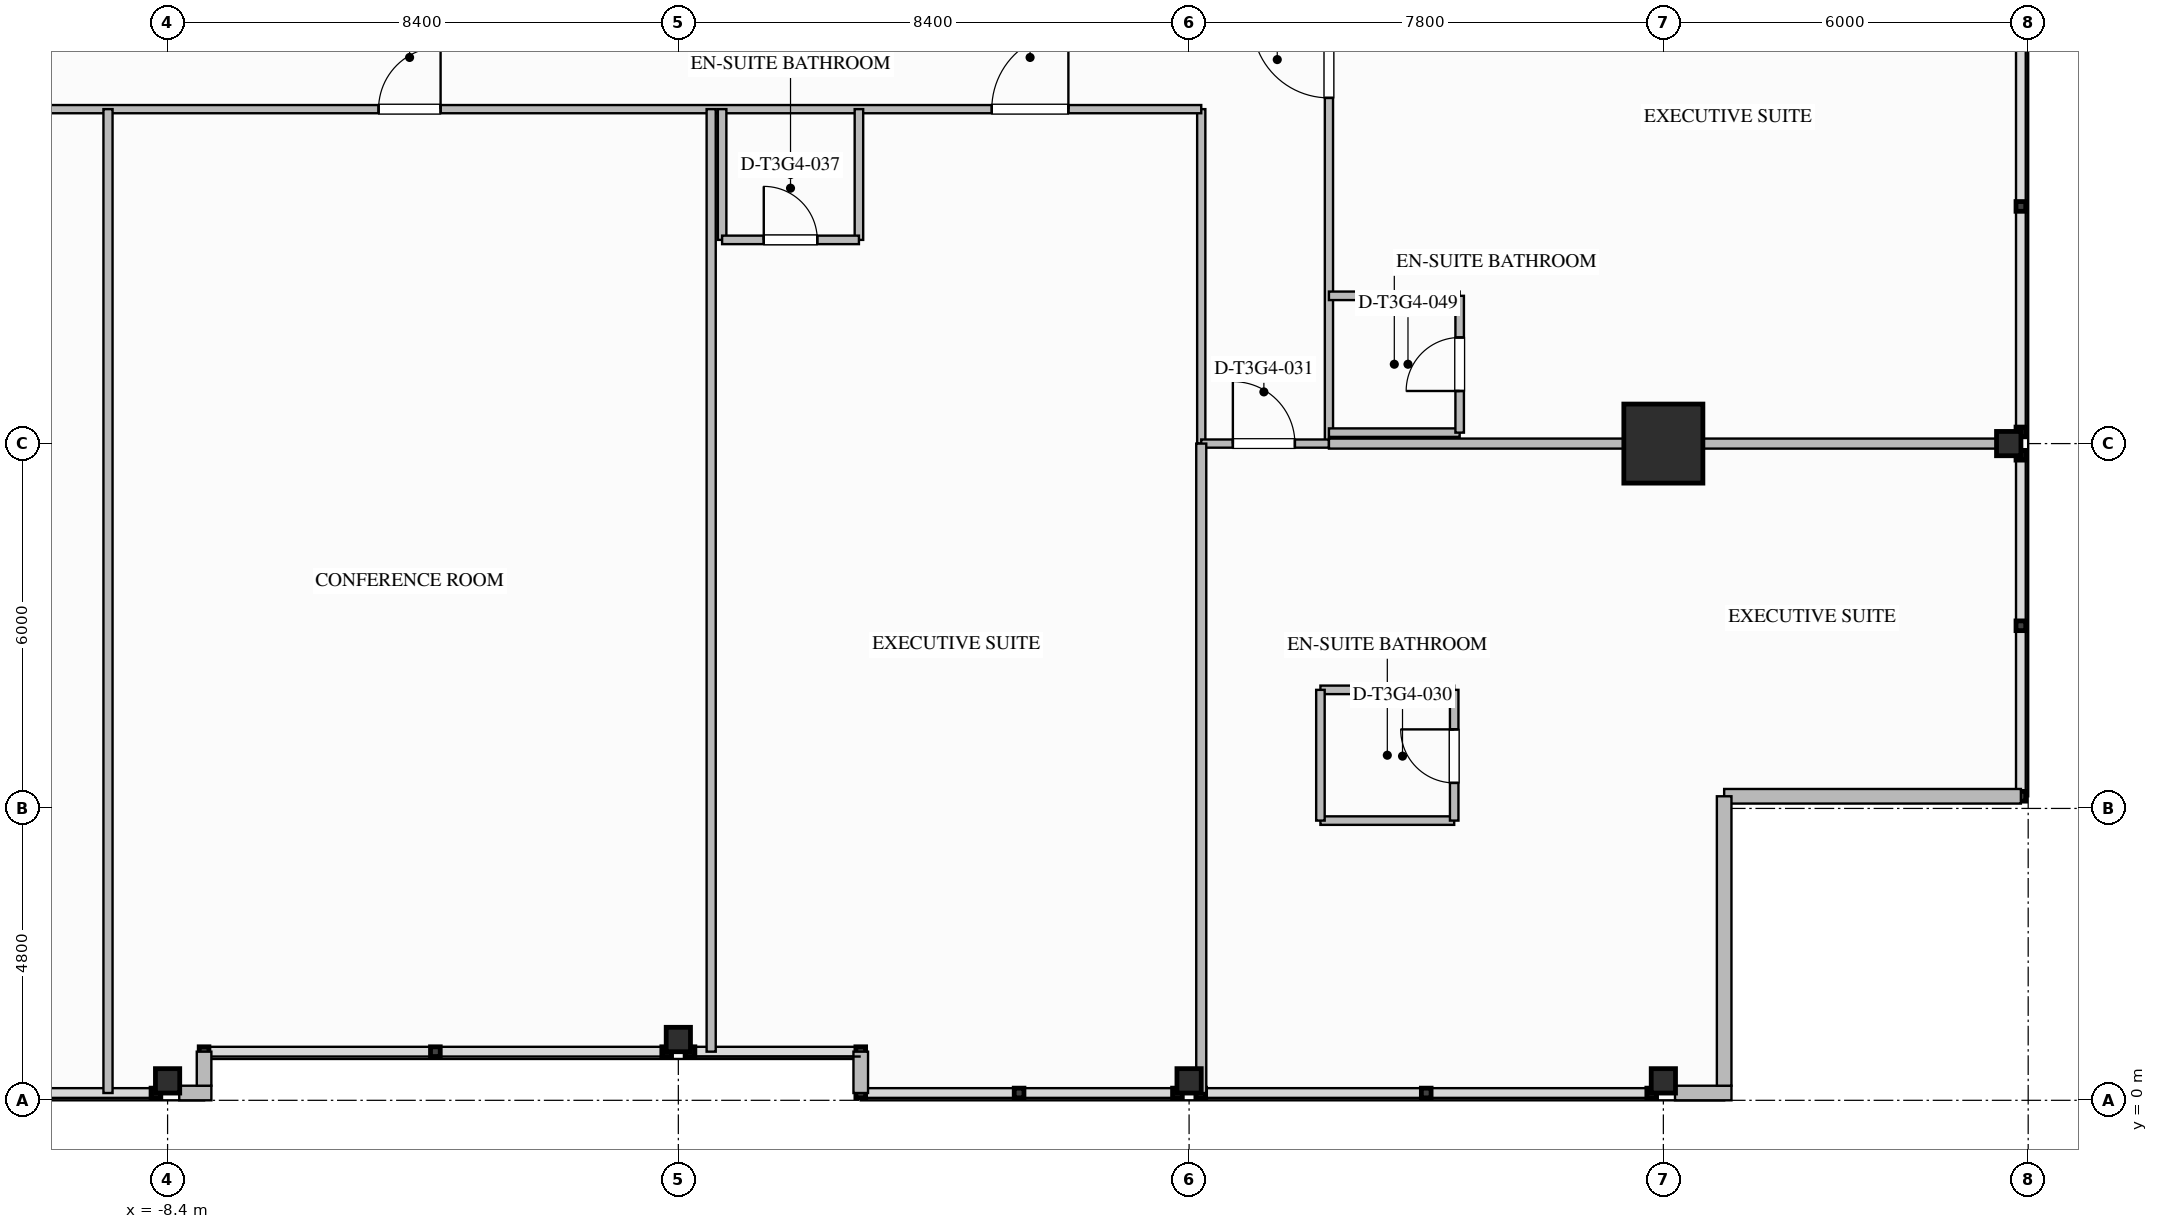
"""IFC4 building model, lengths in metres.
Left out: names, types, materials, properties, quantities, classifications, styles, units other than length and angle.
Written with IfcOpenShell. Run it as: python <this file> out.ifc"""

import sys

from ifc_helpers import new_model, si_unit, direction, frame, frame_2d, origin, origin_2d, place, context, subcontext, project, spatial, rectangle, i_section, extrude, element, fill, save


model = new_model("IFC4")
c1 = context("Model", 3, precision=1e-05, world=origin(), true_north=direction((0.0, 1.0)))
c2 = subcontext(c1, "Body", "Model", "MODEL_VIEW")
j1 = project(units=[si_unit("LENGTHUNIT", "METRE"), si_unit("PLANEANGLEUNIT", "RADIAN")], contexts=[c1])
p1 = place(None, origin())
s1 = spatial("IfcSite", under=j1, at=p1, CompositionType="ELEMENT")
p2 = place(p1, origin())
s2 = spatial("IfcBuilding", under=s1, at=p2, CompositionType="ELEMENT")
p3 = place(p2, frame((0.0, 0.0, 182.35)))
s3 = spatial("IfcBuildingStorey", under=s2, at=p3, CompositionType="ELEMENT", Elevation=182.35)
p4 = place(p3, frame((16.2, 10.8, 0.0), z_axis=(0.0, 0.0, 1.0), x_axis=(1.0, 0.0, 0.0)))
e1 = element("IfcColumn", 1, at=p4, inside=s3, PredefinedType="COLUMN", context=c2, shape_type="SweptSolid", body=[
    extrude(rectangle(XDim=1.3, YDim=1.3, at=origin_2d()), origin(), (0.0, 0.0, 1.0), 3.55),
])
for number, where, z_axis, x_axis in (
    (2, (21.88, 10.8, 0.0), (0.0, 0.0, 1.0), (1.0, 0.0, 0.0)),
    (3, (-8.4, 0.32, 0.0), (0.0, 0.0, 1.0), (0.0, 1.0, 0.0)),
    (4, (0.0, 1.0, 0.0), (0.0, 0.0, 1.0), (0.0, 1.0, 0.0)),
    (5, (8.4, 0.32, 0.0), (0.0, 0.0, 1.0), (0.0, 1.0, 0.0)),
    (6, (16.2, 0.32, 0.0), (0.0, 0.0, 1.0), (0.0, 1.0, 0.0)),
):
    element("IfcColumn", number, at=place(p3, frame(where, z_axis=z_axis, x_axis=x_axis)), inside=s3, PredefinedType="COLUMN", context=c2, shape_type="SweptSolid", body=[
        extrude(i_section(OverallWidth=0.401, OverallDepth=0.399, WebThickness=0.025, FlangeThickness=0.04, FilletRadius=0.025, at=origin_2d()), origin(), (0.0, 0.0, 1.0), 3.547),
    ])
p5 = place(p3, frame((17.32, 0.12, 0.0), z_axis=(0.0, 0.0, 1.0), x_axis=(-1.0, 0.0, 0.0)))
e7 = element("IfcWall", 7, at=p5, inside=s3, PredefinedType="STANDARD", context=c2, shape_type="SweptSolid", body=[
    extrude(rectangle(XDim=0.928, YDim=0.24, at=frame_2d((0.464, 0.0))), origin(), (0.0, 0.0, 1.0), 3.29),
])
p6 = place(p3, frame((-7.68, 0.12, 0.0), z_axis=(0.0, 0.0, 1.0), x_axis=(-1.0, 0.0, 0.0)))
e8 = element("IfcWall", 8, at=p6, inside=s3, PredefinedType="STANDARD", context=c2, shape_type="SweptSolid", body=[
    extrude(rectangle(XDim=0.528, YDim=0.24, at=frame_2d((0.264, 0.0))), origin(), (0.0, 0.0, 1.0), 3.29),
])
p7 = place(p3, frame((22.08, 5.0, 0.0), z_axis=(0.0, 0.0, 1.0), x_axis=(-1.0, 0.0, 0.0)))
e9 = element("IfcWall", 9, at=p7, inside=s3, PredefinedType="STANDARD", context=c2, shape_type="SweptSolid", body=[
    extrude(rectangle(XDim=4.88, YDim=0.24, at=frame_2d((2.44, 0.0))), origin(), (0.0, 0.0, 1.0), 3.29),
])
p8 = place(p3, frame((17.2, 5.0, 0.0), z_axis=(0.0, 0.0, 1.0), x_axis=(0.0, -1.0, 0.0)))
e10 = element("IfcWall", 10, at=p8, inside=s3, PredefinedType="STANDARD", context=c2, shape_type="SweptSolid", body=[
    extrude(rectangle(XDim=4.76, YDim=0.24, at=frame_2d((2.38, 0.0))), origin(), (0.0, 0.0, 1.0), 3.29),
])
p9 = place(p3, frame((3.0, 0.12, 0.0), z_axis=(0.0, 0.0, 1.0), x_axis=(0.0, 1.0, 0.0)))
e11 = element("IfcWall", 11, at=p9, inside=s3, PredefinedType="STANDARD", context=c2, shape_type="SweptSolid", body=[
    extrude(rectangle(XDim=0.68, YDim=0.24, at=frame_2d((0.34, 0.0))), origin(), (0.0, 0.0, 1.0), 3.29),
])
p10 = place(p3, frame((-7.8, 0.8, 0.0), z_axis=(0.0, 0.0, 1.0), x_axis=(0.0, -1.0, 0.0)))
e12 = element("IfcWall", 12, at=p10, inside=s3, PredefinedType="STANDARD", context=c2, shape_type="SweptSolid", body=[
    extrude(rectangle(XDim=0.56, YDim=0.24, at=frame_2d((0.28, 0.0))), origin(), (0.0, 0.0, 1.0), 3.29),
])
p11 = place(p3, frame((8.6, 10.8, 0.0), z_axis=(0.0, 0.0, 1.0), x_axis=(0.0, 1.0, 0.0)))
e13 = element("IfcWall", 13, at=p11, inside=s3, PredefinedType="PARTITIONING", context=c2, shape_type="SweptSolid", body=[
    extrude(rectangle(XDim=5.5, YDim=0.135, at=frame_2d((2.75, 0.0))), origin(), (0.0, 0.0, 1.0), 2.667),
])
p12 = place(p3, frame((-16.2, 16.3, 0.0), z_axis=(0.0, 0.0, 1.0), x_axis=(1.0, 0.0, 0.0)))
e14 = element("IfcWall", 14, at=p12, inside=s3, PredefinedType="PARTITIONING", context=c2, shape_type="SweptSolid", body=[
    extrude(rectangle(XDim=24.8, YDim=0.135, at=frame_2d((12.4, 0.0))), origin(), (0.0, 0.0, 1.0), 3.29),
])
p13 = place(p12, frame((3.995, 0.0, 0.0)))
e15 = element("IfcOpeningElement", 15, at=p13, cuts=e14, PredefinedType="OPENING", context=c2, shape_type="SweptSolid", body=[
    extrude(rectangle(XDim=1.26, YDim=2.2, at=frame_2d((0.63, 1.1))), frame((0.0, 0.077, 0.0), z_axis=(0.0, -1.0, 0.0), x_axis=(1.0, 0.0, 0.0)), (0.0, 0.0, 1.0), 0.155),
])
p14 = place(p12, frame((11.27, 0.0, 0.0)))
e16 = element("IfcOpeningElement", 16, at=p14, cuts=e14, PredefinedType="OPENING", context=c2, shape_type="SweptSolid", body=[
    extrude(rectangle(XDim=1.02, YDim=2.15, at=frame_2d((0.51, 1.075))), frame((0.0, 0.077, 0.0), z_axis=(0.0, -1.0, 0.0), x_axis=(1.0, 0.0, 0.0)), (0.0, 0.0, 1.0), 0.155),
])
p15 = place(p12, frame((21.355, 0.0, 0.0)))
e17 = element("IfcOpeningElement", 17, at=p15, cuts=e14, PredefinedType="OPENING", context=c2, shape_type="SweptSolid", body=[
    extrude(rectangle(XDim=1.26, YDim=2.2, at=frame_2d((0.63, 1.1))), frame((0.0, 0.077, 0.0), z_axis=(0.0, -1.0, 0.0), x_axis=(1.0, 0.0, 0.0)), (0.0, 0.0, 1.0), 0.155),
])
p16 = place(p3, frame((10.7, 10.8, 0.0), z_axis=(0.0, 0.0, 1.0), x_axis=(0.0, 1.0, 0.0)))
e18 = element("IfcWall", 18, at=p16, inside=s3, PredefinedType="PARTITIONING", context=c2, shape_type="SweptSolid", body=[
    extrude(rectangle(XDim=32.4, YDim=0.135, at=frame_2d((16.2, 0.0))), origin(), (0.0, 0.0, 1.0), 3.29),
])
p17 = place(p16, frame((5.685, 0.0, 0.0)))
e19 = element("IfcOpeningElement", 19, at=p17, cuts=e18, PredefinedType="OPENING", context=c2, shape_type="SweptSolid", body=[
    extrude(rectangle(XDim=1.26, YDim=2.2, at=frame_2d((0.63, 1.1))), frame((0.0, 0.077, 0.0), z_axis=(0.0, -1.0, 0.0), x_axis=(1.0, 0.0, 0.0)), (0.0, 0.0, 1.0), 0.155),
])
p18 = place(p16, frame((11.655, 0.0, 0.0)))
e20 = element("IfcOpeningElement", 20, at=p18, cuts=e18, PredefinedType="OPENING", context=c2, shape_type="SweptSolid", body=[
    extrude(rectangle(XDim=1.26, YDim=2.2, at=frame_2d((0.63, 1.1))), frame((0.0, 0.077, 0.0), z_axis=(0.0, -1.0, 0.0), x_axis=(1.0, 0.0, 0.0)), (0.0, 0.0, 1.0), 0.155),
])
p19 = place(p16, frame((21.885, 0.0, 0.0)))
e21 = element("IfcOpeningElement", 21, at=p19, cuts=e18, PredefinedType="OPENING", context=c2, shape_type="SweptSolid", body=[
    extrude(rectangle(XDim=1.26, YDim=2.2, at=frame_2d((0.63, 1.1))), frame((0.0, 0.077, 0.0), z_axis=(0.0, -1.0, 0.0), x_axis=(1.0, 0.0, 0.0)), (0.0, 0.0, 1.0), 0.155),
])
p20 = place(p16, frame((27.255, 0.0, 0.0)))
e22 = element("IfcOpeningElement", 22, at=p20, cuts=e18, PredefinedType="OPENING", context=c2, shape_type="SweptSolid", body=[
    extrude(rectangle(XDim=1.26, YDim=2.2, at=frame_2d((0.63, 1.1))), frame((0.0, 0.077, 0.0), z_axis=(0.0, -1.0, 0.0), x_axis=(1.0, 0.0, 0.0)), (0.0, 0.0, 1.0), 0.155),
])
p21 = place(p3, frame((8.6, 10.8, 0.0), z_axis=(0.0, 0.0, 1.0), x_axis=(1.0, 0.0, 0.0)))
e23 = element("IfcWall", 23, at=p21, inside=s3, PredefinedType="PARTITIONING", context=c2, shape_type="SweptSolid", body=[
    extrude(rectangle(XDim=2.1, YDim=0.135, at=frame_2d((1.05, 0.0))), origin(), (0.0, 0.0, 1.0), 2.579),
])
p22 = place(p21, frame((0.52, 0.0, 0.0)))
e24 = element("IfcOpeningElement", 24, at=p22, cuts=e23, PredefinedType="OPENING", context=c2, shape_type="SweptSolid", body=[
    extrude(rectangle(XDim=1.02, YDim=2.15, at=frame_2d((0.51, 1.075))), frame((0.0, 0.077, 0.0), z_axis=(0.0, -1.0, 0.0), x_axis=(1.0, 0.0, 0.0)), (0.0, 0.0, 1.0), 0.155),
])
p23 = place(p3, frame((8.6, 0.12, 0.0), z_axis=(0.0, 0.0, 1.0), x_axis=(0.0, 1.0, 0.0)))
e25 = element("IfcWall", 25, at=p23, inside=s3, PredefinedType="PARTITIONING", context=c2, shape_type="SweptSolid", body=[
    extrude(rectangle(XDim=10.68, YDim=0.165, at=frame_2d((5.34, 0.0))), origin(), (0.0, 0.0, 1.0), 2.579),
])
p24 = place(p3, frame((10.7, 10.8, 0.0), z_axis=(0.0, 0.0, 1.0), x_axis=(1.0, 0.0, 0.0)))
e26 = element("IfcWall", 26, at=p24, inside=s3, PredefinedType="PARTITIONING", context=c2, shape_type="SweptSolid", body=[
    extrude(rectangle(XDim=11.38, YDim=0.165, at=frame_2d((5.69, 0.0))), origin(), (0.0, 0.0, 1.0), 2.579),
])
for number, where, z_axis, x_axis in (
    (27, (10.56, 4.6, 0.0), (0.0, 0.0, 1.0), (1.0, 0.0, 0.0)),
    (28, (10.56, 6.75, 0.0), (0.0, 0.0, 1.0), (1.0, 0.0, 0.0)),
):
    element("IfcWall", number, at=place(p3, frame(where, z_axis=z_axis, x_axis=x_axis)), inside=s3, PredefinedType="PLUMBINGWALL", context=c2, shape_type="SweptSolid", body=[
        extrude(rectangle(XDim=2.2, YDim=0.14, at=frame_2d((1.1, 0.0))), origin(), (0.0, 0.0, 1.0), 3.29),
    ])
p25 = place(p3, frame((10.56, 4.6, 0.0), z_axis=(0.0, 0.0, 1.0), x_axis=(0.0, 1.0, 0.0)))
e29 = element("IfcWall", 29, at=p25, inside=s3, PredefinedType="PLUMBINGWALL", context=c2, shape_type="SweptSolid", body=[
    extrude(rectangle(XDim=2.15, YDim=0.14, at=frame_2d((1.075, 0.0))), origin(), (0.0, 0.0, 1.0), 3.29),
])
p26 = place(p3, frame((12.76, 4.6, 0.0), z_axis=(0.0, 0.0, 1.0), x_axis=(0.0, 1.0, 0.0)))
e30 = element("IfcWall", 30, at=p26, inside=s3, PredefinedType="PLUMBINGWALL", context=c2, shape_type="SweptSolid", body=[
    extrude(rectangle(XDim=2.15, YDim=0.14, at=frame_2d((1.075, 0.0))), origin(), (0.0, 0.0, 1.0), 3.29),
])
p27 = place(p26, frame((0.62, 0.0, 0.0)))
e31 = element("IfcOpeningElement", 31, at=p27, cuts=e30, PredefinedType="OPENING", context=c2, shape_type="SweptSolid", body=[
    extrude(rectangle(XDim=0.88, YDim=2.1, at=frame_2d((0.44, 1.05))), frame((0.0, 0.08, 0.0), z_axis=(0.0, -1.0, 0.0), x_axis=(1.0, 0.0, 0.0)), (0.0, 0.0, 1.0), 0.16),
])
p28 = place(p3, frame((-9.38, 0.12, 0.0), z_axis=(0.0, 0.0, 1.0), x_axis=(0.0, 1.0, 0.0)))
e32 = element("IfcWall", 32, at=p28, inside=s3, PredefinedType="PARTITIONING", context=c2, shape_type="SweptSolid", body=[
    extrude(rectangle(XDim=16.18, YDim=0.15, at=frame_2d((8.09, 0.0))), origin(), (0.0, 0.0, 1.0), 3.29),
])
p29 = place(p3, frame((0.54, 0.8, 0.0), z_axis=(0.0, 0.0, 1.0), x_axis=(0.0, 1.0, 0.0)))
e33 = element("IfcWall", 33, at=p29, inside=s3, PredefinedType="PARTITIONING", context=c2, shape_type="SweptSolid", body=[
    extrude(rectangle(XDim=15.5, YDim=0.15, at=frame_2d((7.75, 0.0))), origin(), (0.0, 0.0, 1.0), 3.29),
])
for number, where, z_axis, x_axis in (
    (34, (0.72, 16.3, 0.0), (0.0, 0.0, 1.0), (0.0, -1.0, 0.0)),
    (35, (2.97, 16.3, 0.0), (0.0, 0.0, 1.0), (0.0, -1.0, 0.0)),
):
    element("IfcWall", number, at=place(p3, frame(where, z_axis=z_axis, x_axis=x_axis)), inside=s3, PredefinedType="PLUMBINGWALL", context=c2, shape_type="SweptSolid", body=[
        extrude(rectangle(XDim=2.15, YDim=0.14, at=frame_2d((1.075, 0.0))), origin(), (0.0, 0.0, 1.0), 3.29),
    ])
p30 = place(p3, frame((0.72, 14.15, 0.0), z_axis=(0.0, 0.0, 1.0), x_axis=(1.0, 0.0, 0.0)))
e36 = element("IfcWall", 36, at=p30, inside=s3, PredefinedType="PLUMBINGWALL", context=c2, shape_type="SweptSolid", body=[
    extrude(rectangle(XDim=2.25, YDim=0.14, at=frame_2d((1.125, 0.0))), origin(), (0.0, 0.0, 1.0), 3.29),
])
p31 = place(p30, frame((0.685, 0.0, 0.0)))
e37 = element("IfcOpeningElement", 37, at=p31, cuts=e36, PredefinedType="OPENING", context=c2, shape_type="SweptSolid", body=[
    extrude(rectangle(XDim=0.88, YDim=2.1, at=frame_2d((0.44, 1.05))), frame((0.0, 0.08, 0.0), z_axis=(0.0, -1.0, 0.0), x_axis=(1.0, 0.0, 0.0)), (0.0, 0.0, 1.0), 0.16),
])
p32 = place(p3, frame((10.7, 10.98, 0.0), z_axis=(0.0, 0.0, 1.0), x_axis=(1.0, 0.0, 0.0)))
e38 = element("IfcWall", 38, at=p32, inside=s3, PredefinedType="PLUMBINGWALL", context=c2, shape_type="SweptSolid", body=[
    extrude(rectangle(XDim=2.15, YDim=0.14, at=frame_2d((1.075, 0.0))), origin(), (0.0, 0.0, 1.0), 2.579),
])
p33 = place(p3, frame((10.7, 13.23, 0.0), z_axis=(0.0, 0.0, 1.0), x_axis=(1.0, 0.0, 0.0)))
e39 = element("IfcWall", 39, at=p33, inside=s3, PredefinedType="PLUMBINGWALL", context=c2, shape_type="SweptSolid", body=[
    extrude(rectangle(XDim=2.15, YDim=0.14, at=frame_2d((1.075, 0.0))), origin(), (0.0, 0.0, 1.0), 3.29),
])
p34 = place(p3, frame((12.85, 10.98, 0.0), z_axis=(0.0, 0.0, 1.0), x_axis=(0.0, 1.0, 0.0)))
e40 = element("IfcWall", 40, at=p34, inside=s3, PredefinedType="PLUMBINGWALL", context=c2, shape_type="SweptSolid", body=[
    extrude(rectangle(XDim=2.25, YDim=0.14, at=frame_2d((1.125, 0.0))), origin(), (0.0, 0.0, 1.0), 3.29),
])
p35 = place(p34, frame((0.685, 0.0, 0.0)))
e41 = element("IfcOpeningElement", 41, at=p35, cuts=e40, PredefinedType="OPENING", context=c2, shape_type="SweptSolid", body=[
    extrude(rectangle(XDim=0.88, YDim=2.1, at=frame_2d((0.44, 1.05))), frame((0.0, 0.08, 0.0), z_axis=(0.0, -1.0, 0.0), x_axis=(1.0, 0.0, 0.0)), (0.0, 0.0, 1.0), 0.16),
])
p36 = place(p27, origin())
e42 = element("IfcDoor", 42, at=p36, inside=s3, OperationType="SINGLE_SWING_RIGHT", PredefinedType="DOOR", context=c2, shape_type="SweptSolid", body=[
    extrude(rectangle(XDim=0.88, YDim=2.1, at=frame_2d((0.44, 1.05))), frame((0.0, 0.025, 0.0), z_axis=(0.0, -1.0, 0.0), x_axis=(1.0, 0.0, 0.0)), (0.0, 0.0, 1.0), 0.05),
])
fill(e31, e42)
p37 = place(p22, origin())
e43 = element("IfcDoor", 43, at=p37, inside=s3, OperationType="SINGLE_SWING_LEFT", PredefinedType="DOOR", context=c2, shape_type="SweptSolid", body=[
    extrude(rectangle(XDim=1.02, YDim=2.15, at=frame_2d((0.51, 1.075))), frame((0.0, 0.025, 0.0), z_axis=(0.0, -1.0, 0.0), x_axis=(1.0, 0.0, 0.0)), (0.0, 0.0, 1.0), 0.05),
])
fill(e24, e43)
p38 = place(p14, origin())
e44 = element("IfcDoor", 44, at=p38, inside=s3, OperationType="SINGLE_SWING_RIGHT", PredefinedType="DOOR", context=c2, shape_type="SweptSolid", body=[
    extrude(rectangle(XDim=1.02, YDim=2.15, at=frame_2d((0.51, 1.075))), frame((0.0, 0.025, 0.0), z_axis=(0.0, -1.0, 0.0), x_axis=(1.0, 0.0, 0.0)), (0.0, 0.0, 1.0), 0.05),
])
fill(e16, e44)
p39 = place(p31, origin())
e45 = element("IfcDoor", 45, at=p39, inside=s3, OperationType="SINGLE_SWING_LEFT", PredefinedType="DOOR", context=c2, shape_type="SweptSolid", body=[
    extrude(rectangle(XDim=0.88, YDim=2.1, at=frame_2d((0.44, 1.05))), frame((0.0, 0.025, 0.0), z_axis=(0.0, -1.0, 0.0), x_axis=(1.0, 0.0, 0.0)), (0.0, 0.0, 1.0), 0.05),
])
fill(e37, e45)
p40 = place(p15, origin())
e46 = element("IfcDoor", 46, at=p40, inside=s3, OperationType="SINGLE_SWING_RIGHT", PredefinedType="DOOR", context=c2, shape_type="SweptSolid", body=[
    extrude(rectangle(XDim=1.26, YDim=2.2, at=frame_2d((0.63, 1.1))), frame((0.0, 0.025, 0.0), z_axis=(0.0, -1.0, 0.0), x_axis=(1.0, 0.0, 0.0)), (0.0, 0.0, 1.0), 0.05),
])
fill(e17, e46)
p41 = place(p35, origin())
e47 = element("IfcDoor", 47, at=p41, inside=s3, OperationType="SINGLE_SWING_LEFT", PredefinedType="DOOR", context=c2, shape_type="SweptSolid", body=[
    extrude(rectangle(XDim=0.88, YDim=2.1, at=frame_2d((0.44, 1.05))), frame((0.0, 0.025, 0.0), z_axis=(0.0, -1.0, 0.0), x_axis=(1.0, 0.0, 0.0)), (0.0, 0.0, 1.0), 0.05),
])
fill(e41, e47)
p42 = place(p17, origin())
e48 = element("IfcDoor", 48, at=p42, inside=s3, OperationType="SINGLE_SWING_RIGHT", PredefinedType="DOOR", context=c2, shape_type="SweptSolid", body=[
    extrude(rectangle(XDim=1.26, YDim=2.2, at=frame_2d((0.63, 1.1))), frame((0.0, 0.025, 0.0), z_axis=(0.0, -1.0, 0.0), x_axis=(1.0, 0.0, 0.0)), (0.0, 0.0, 1.0), 0.05),
])
fill(e19, e48)
save(model, sys.argv[1])
